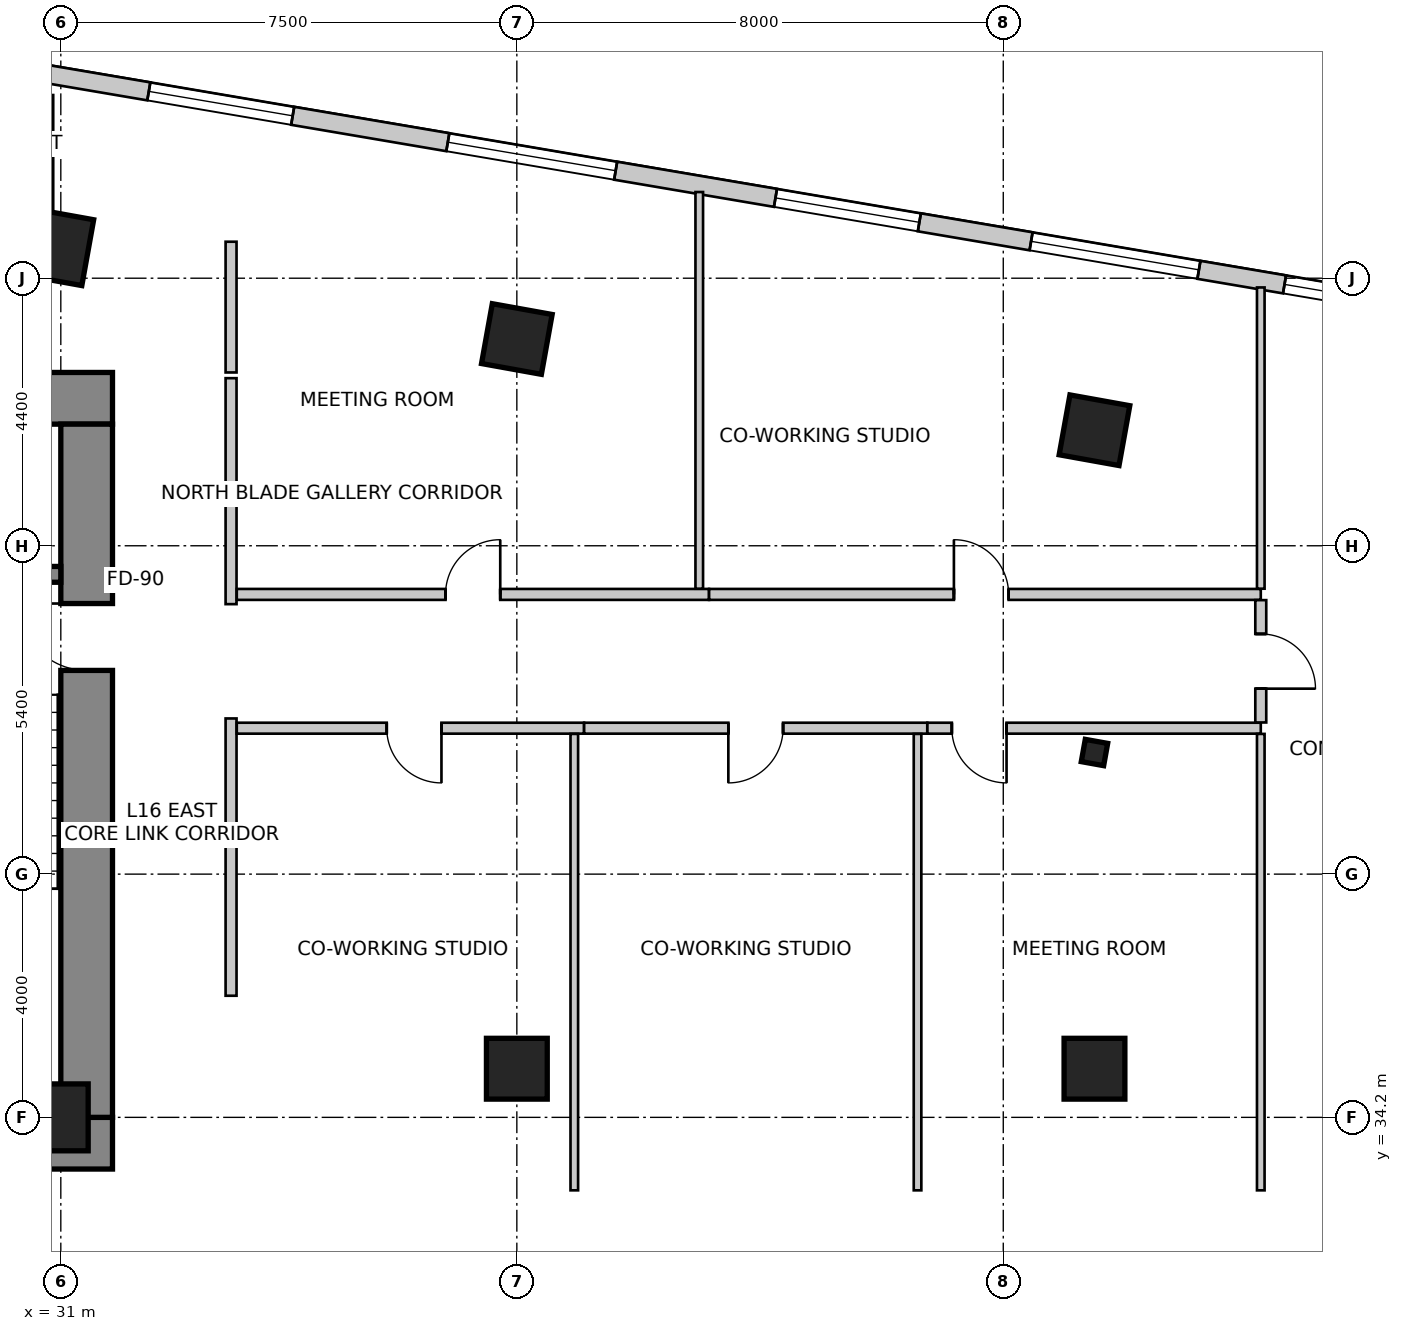
"""IFC4 building model, lengths in metres.
Left out: names, types, materials, properties, quantities, classifications, styles, units other than length and angle.
Written with IfcOpenShell. Run it as: python <this file> out.ifc"""

import sys

from ifc_helpers import new_model, si_unit, direction, frame, frame_2d, origin, origin_2d, place, context, subcontext, project, spatial, rectangle, i_section, extrude, source, transform, mapped, element, fill, save


model = new_model("IFC4")
c1 = context("Model", 3, precision=1e-05, world=origin(), true_north=direction((0.0, 1.0)))
c2 = subcontext(c1, "Body", "Model", "MODEL_VIEW")
j1 = project(units=[si_unit("LENGTHUNIT", "METRE"), si_unit("PLANEANGLEUNIT", "RADIAN")], contexts=[c1])
p1 = place(None, origin())
s1 = spatial("IfcSite", under=j1, at=p1, CompositionType="ELEMENT")
p2 = place(p1, origin())
s2 = spatial("IfcBuilding", under=s1, at=p2, CompositionType="ELEMENT")
p3 = place(p2, frame((0.0, 0.0, 67.0)))
s3 = spatial("IfcBuildingStorey", under=s2, at=p3, CompositionType="ELEMENT", Elevation=67.0)
p4 = place(p3, frame((15.75, 46.025, 0.0), z_axis=(0.0, 0.0, 1.0), x_axis=(1.0, 0.0, 0.0)))
e1 = element("IfcWall", 1, at=p4, inside=s3, PredefinedType="SHEAR", context=c2, shape_type="SweptSolid", body=[
    extrude(rectangle(XDim=16.1, YDim=0.85, at=frame_2d((8.05, 0.0))), origin(), (0.0, 0.0, 1.0), 4.0),
])
p5 = place(p3, frame((15.75, 33.775, 0.0), z_axis=(0.0, 0.0, 1.0), x_axis=(1.0, 0.0, 0.0)))
e2 = element("IfcWall", 2, at=p5, inside=s3, PredefinedType="SHEAR", context=c2, shape_type="SweptSolid", body=[
    extrude(rectangle(XDim=16.1, YDim=0.85, at=frame_2d((8.05, 0.0))), origin(), (0.0, 0.0, 1.0), 4.0),
])
m1 = source(origin(), c2, "Body", "SweptSolid", [
    extrude(rectangle(XDim=1.3, YDim=2.15, at=frame_2d((0.65, 1.075))), frame((0.0, 0.435, 0.0), z_axis=(0.0, -1.0, 0.0), x_axis=(1.0, 0.0, 0.0)), (0.0, 0.0, 1.0), 0.87),
])
p6 = place(p5, frame((10.18, 0.0, 0.0)))
e3 = element("IfcOpeningElement", 3, at=p6, cuts=e2, PredefinedType="OPENING", context=c2, shape_type="MappedRepresentation", body=[
    mapped(m1, transform((0.0, 0.0, 0.0), scale=1.0)),
])
p7 = place(p3, frame((31.425, 34.2, 0.0), z_axis=(0.0, 0.0, 1.0), x_axis=(0.0, 1.0, 0.0)))
e4 = element("IfcWall", 4, at=p7, inside=s3, PredefinedType="SHEAR", context=c2, shape_type="SweptSolid", body=[
    extrude(rectangle(XDim=11.4, YDim=0.85, at=frame_2d((5.7, 0.0))), origin(), (0.0, 0.0, 1.0), 4.0),
])
m2 = source(origin(), c2, "Body", "SweptSolid", [
    extrude(rectangle(XDim=1.1, YDim=2.15, at=frame_2d((0.55, 1.075))), frame((0.0, 0.435, 0.0), z_axis=(0.0, -1.0, 0.0), x_axis=(1.0, 0.0, 0.0)), (0.0, 0.0, 1.0), 0.87),
])
p8 = place(p7, frame((7.35, 0.0, 0.0)))
e5 = element("IfcOpeningElement", 5, at=p8, cuts=e4, PredefinedType="OPENING", context=c2, shape_type="MappedRepresentation", body=[
    mapped(m2, transform((0.0, 0.0, 0.0), scale=1.0)),
])
p9 = place(p3, frame((27.5, 43.13, 0.0), z_axis=(0.0, 0.0, 1.0), x_axis=(1.0, 0.0, 0.0)))
e6 = element("IfcWall", 6, at=p9, inside=s3, PredefinedType="SHEAR", context=c2, shape_type="SweptSolid", body=[
    extrude(rectangle(XDim=3.5, YDim=0.26, at=frame_2d((1.75, 0.0))), origin(), (0.0, 0.0, 1.0), 4.0),
])
m3 = source(origin(), c2, "Body", "SweptSolid", [
    extrude(rectangle(XDim=0.9, YDim=1.1, at=origin_2d()), origin(), (0.0, 0.0, 1.0), 4.0),
])
p10 = place(p3, frame((31.0, 48.5, 0.0), z_axis=(0.0, 0.0, 1.0), x_axis=(0.984195607969, -0.17708474032, 0.0)))
e7 = element("IfcColumn", 7, at=p10, inside=s3, PredefinedType="COLUMN", context=c2, shape_type="MappedRepresentation", body=[
    mapped(m3, transform((0.0, 0.0, 0.0), scale=1.0)),
])
m4 = source(origin(), c2, "Body", "SweptSolid", [
    extrude(rectangle(XDim=1.0, YDim=1.0, at=origin_2d()), origin(), (0.0, 0.0, 1.0), 4.0),
])
for number, where, z_axis, x_axis in (
    (8, (38.5, 47.0, 0.0), (0.0, 0.0, 1.0), (0.984, -0.177, 0.0)),
    (9, (48.0, 45.5, 0.0), (0.0, 0.0, 1.0), (0.984, -0.177, 0.0)),
):
    element("IfcColumn", number, at=place(p3, frame(where, z_axis=z_axis, x_axis=x_axis)), inside=s3, PredefinedType="COLUMN", context=c2, shape_type="MappedRepresentation", body=[
        mapped(m4, transform((0.0, 0.0, 0.0), scale=1.0)),
    ])
p11 = place(p3, frame((31.0, 34.2, 0.0), z_axis=(0.0, 0.0, 1.0), x_axis=(1.0, 0.0, 0.0)))
e10 = element("IfcColumn", 10, at=p11, inside=s3, PredefinedType="COLUMN", context=c2, shape_type="MappedRepresentation", body=[
    mapped(m3, transform((0.0, 0.0, 0.0), scale=1.0)),
])
for number, where, z_axis, x_axis in (
    (11, (38.5, 35.0, 0.0), (0.0, 0.0, 1.0), (1.0, 0.0, 0.0)),
    (12, (48.0, 35.0, 0.0), (0.0, 0.0, 1.0), (1.0, 0.0, 0.0)),
):
    element("IfcColumn", number, at=place(p3, frame(where, z_axis=z_axis, x_axis=x_axis)), inside=s3, PredefinedType="COLUMN", context=c2, shape_type="MappedRepresentation", body=[
        mapped(m4, transform((0.0, 0.0, 0.0), scale=1.0)),
    ])
m5 = source(origin(), c2, "Body", "SweptSolid", [
    extrude(i_section(OverallWidth=0.374, OverallDepth=0.372, WebThickness=0.016, FlangeThickness=0.026, FilletRadius=0.015, at=origin_2d()), origin(), (0.0, 0.0, 1.0), 4.0),
])
p12 = place(p3, frame((48.0, 40.2, 0.0), z_axis=(0.0, 0.0, 1.0), x_axis=(0.984195607969, -0.17708474032, 0.0)))
e13 = element("IfcColumn", 13, at=p12, inside=s3, PredefinedType="COLUMN", context=c2, shape_type="MappedRepresentation", body=[
    mapped(m5, transform((0.0, 0.0, 0.0), scale=1.0)),
])
p13 = place(p3, frame((53.961, 47.417, 0.0), z_axis=(0.0, 0.0, 1.0), x_axis=(-0.985865713455, 0.167537443678, 0.0)))
e14 = element("IfcWall", 14, at=p13, inside=s3, PredefinedType="SOLIDWALL", context=c2, shape_type="SweptSolid", body=[
    extrude(rectangle(XDim=32.537, YDim=0.3, at=frame_2d((16.269, 0.0))), origin(), (0.0, 0.0, 1.0), 3.75),
])
m6 = source(origin(), c2, "Body", "SweptSolid", [
    extrude(rectangle(XDim=2.4, YDim=2.2, at=frame_2d((1.2, 1.1))), frame((0.0, 0.16, 0.0), z_axis=(0.0, -1.0, 0.0), x_axis=(1.0, 0.0, 0.0)), (0.0, 0.0, 1.0), 0.32),
])
p14 = place(p13, frame((0.476, 0.0, 0.85)))
e15 = element("IfcOpeningElement", 15, at=p14, cuts=e14, PredefinedType="OPENING", context=c2, shape_type="MappedRepresentation", body=[
    mapped(m6, transform((0.0, 0.0, 0.0), scale=1.0)),
])
m7 = source(origin(), c2, "Body", "SweptSolid", [
    extrude(rectangle(XDim=2.8, YDim=2.4, at=frame_2d((1.4, 1.2))), frame((0.0, 0.16, 0.0), z_axis=(0.0, -1.0, 0.0), x_axis=(1.0, 0.0, 0.0)), (0.0, 0.0, 1.0), 0.32),
])
p15 = place(p13, frame((4.304, 0.0, 0.85)))
e16 = element("IfcOpeningElement", 16, at=p15, cuts=e14, PredefinedType="OPENING", context=c2, shape_type="MappedRepresentation", body=[
    mapped(m7, transform((0.0, 0.0, 0.0), scale=1.0)),
])
p16 = place(p13, frame((8.968, 0.0, 0.85)))
e17 = element("IfcOpeningElement", 17, at=p16, cuts=e14, PredefinedType="OPENING", context=c2, shape_type="MappedRepresentation", body=[
    mapped(m6, transform((0.0, 0.0, 0.0), scale=1.0)),
])
p17 = place(p13, frame((14.034, 0.0, 0.85)))
e18 = element("IfcOpeningElement", 18, at=p17, cuts=e14, PredefinedType="OPENING", context=c2, shape_type="MappedRepresentation", body=[
    mapped(m7, transform((0.0, 0.0, 0.0), scale=1.0)),
])
p18 = place(p13, frame((19.422, 0.0, 0.85)))
e19 = element("IfcOpeningElement", 19, at=p18, cuts=e14, PredefinedType="OPENING", context=c2, shape_type="MappedRepresentation", body=[
    mapped(m6, transform((0.0, 0.0, 0.0), scale=1.0)),
])
p19 = place(p13, frame((24.895, 0.0, 0.85)))
e20 = element("IfcOpeningElement", 20, at=p19, cuts=e14, PredefinedType="OPENING", context=c2, shape_type="MappedRepresentation", body=[
    mapped(m7, transform((0.0, 0.0, 0.0), scale=1.0)),
])
p20 = place(p13, frame((29.395, 0.0, 0.85)))
e21 = element("IfcOpeningElement", 21, at=p20, cuts=e14, PredefinedType="OPENING", context=c2, shape_type="MappedRepresentation", body=[
    mapped(m7, transform((0.0, 0.0, 0.0), scale=1.0)),
])
p21 = place(p3, frame((25.362, 48.6, 0.0), z_axis=(0.0, 0.0, 1.0), x_axis=(1.0, 0.0, 0.0)))
e22 = element("IfcWall", 22, at=p21, inside=s3, PredefinedType="PARTITIONING", context=c2, shape_type="SweptSolid", body=[
    extrude(rectangle(XDim=5.598, YDim=0.18, at=frame_2d((2.799, 0.0))), origin(), (0.0, 0.0, 1.0), 2.892),
])
m8 = source(origin(), c2, "Body", "SweptSolid", [
    extrude(rectangle(XDim=0.9, YDim=2.15, at=frame_2d((0.45, 1.075))), frame((0.0, 0.1, 0.0), z_axis=(0.0, -1.0, 0.0), x_axis=(1.0, 0.0, 0.0)), (0.0, 0.0, 1.0), 0.2),
])
p22 = place(p21, frame((2.349, 0.0, 0.0)))
e23 = element("IfcOpeningElement", 23, at=p22, cuts=e22, PredefinedType="OPENING", context=c2, shape_type="MappedRepresentation", body=[
    mapped(m8, transform((0.0, 0.0, 0.0), scale=1.0)),
])
p23 = place(p3, frame((33.8, 48.6, 0.0), z_axis=(0.0, 0.0, 1.0), x_axis=(0.0, -1.0, 0.0)))
e24 = element("IfcWall", 24, at=p23, inside=s3, PredefinedType="PARTITIONING", context=c2, shape_type="SweptSolid", body=[
    extrude(rectangle(XDim=2.15, YDim=0.18, at=frame_2d((1.075, 0.0))), origin(), (0.0, 0.0, 1.0), 2.892),
])
p24 = place(p3, frame((33.8, 40.76, 0.0), z_axis=(0.0, 0.0, 1.0), x_axis=(0.0, -1.0, 0.0)))
e25 = element("IfcWall", 25, at=p24, inside=s3, PredefinedType="PARTITIONING", context=c2, shape_type="SweptSolid", body=[
    extrude(rectangle(XDim=4.56, YDim=0.18, at=frame_2d((2.28, 0.0))), origin(), (0.0, 0.0, 1.0), 3.75),
])
p25 = place(p3, frame((33.8, 46.356, 0.0), z_axis=(0.0, 0.0, 1.0), x_axis=(0.0, -1.0, 0.0)))
e26 = element("IfcWall", 26, at=p25, inside=s3, PredefinedType="PARTITIONING", context=c2, shape_type="SweptSolid", body=[
    extrude(rectangle(XDim=3.716, YDim=0.18, at=frame_2d((1.858, 0.0))), origin(), (0.0, 0.0, 1.0), 3.279),
])
p26 = place(p3, frame((39.605, 40.6, 0.0), z_axis=(0.0, 0.0, 1.0), x_axis=(-1.0, 0.0, 0.0)))
e27 = element("IfcWall", 27, at=p26, inside=s3, PredefinedType="PARTITIONING", context=c2, shape_type="SweptSolid", body=[
    extrude(rectangle(XDim=5.711, YDim=0.18, at=frame_2d((2.855, 0.0))), origin(), (0.0, 0.0, 1.0), 3.125),
])
p27 = place(p26, frame((2.345, 0.0, 0.0)))
e28 = element("IfcOpeningElement", 28, at=p27, cuts=e27, PredefinedType="OPENING", context=c2, shape_type="MappedRepresentation", body=[
    mapped(m8, transform((0.0, 0.0, 0.0), scale=1.0)),
])
p28 = place(p3, frame((45.25, 40.6, 0.0), z_axis=(0.0, 0.0, 1.0), x_axis=(-1.0, 0.0, 0.0)))
e29 = element("IfcWall", 29, at=p28, inside=s3, PredefinedType="PARTITIONING", context=c2, shape_type="SweptSolid", body=[
    extrude(rectangle(XDim=5.643, YDim=0.18, at=frame_2d((2.822, 0.0))), origin(), (0.0, 0.0, 1.0), 3.279),
])
p29 = place(p28, frame((2.372, 0.0, 0.0)))
e30 = element("IfcOpeningElement", 30, at=p29, cuts=e29, PredefinedType="OPENING", context=c2, shape_type="MappedRepresentation", body=[
    mapped(m8, transform((0.0, 0.0, 0.0), scale=1.0)),
])
p30 = place(p3, frame((50.735, 40.6, 0.0), z_axis=(0.0, 0.0, 1.0), x_axis=(-1.0, 0.0, 0.0)))
e31 = element("IfcWall", 31, at=p30, inside=s3, PredefinedType="PARTITIONING", context=c2, shape_type="SweptSolid", body=[
    extrude(rectangle(XDim=5.483, YDim=0.18, at=frame_2d((2.742, 0.0))), origin(), (0.0, 0.0, 1.0), 3.125),
])
p31 = place(p30, frame((4.181, 0.0, 0.0)))
e32 = element("IfcOpeningElement", 32, at=p31, cuts=e31, PredefinedType="OPENING", context=c2, shape_type="MappedRepresentation", body=[
    mapped(m8, transform((0.0, 0.0, 0.0), scale=1.0)),
])
p32 = place(p3, frame((33.894, 42.8, 0.0), z_axis=(0.0, 0.0, 1.0), x_axis=(1.0, 0.0, 0.0)))
e33 = element("IfcWall", 33, at=p32, inside=s3, PredefinedType="PARTITIONING", context=c2, shape_type="SweptSolid", body=[
    extrude(rectangle(XDim=7.766, YDim=0.18, at=frame_2d((3.883, 0.0))), origin(), (0.0, 0.0, 1.0), 3.125),
])
p33 = place(p32, frame((3.433, 0.0, 0.0)))
e34 = element("IfcOpeningElement", 34, at=p33, cuts=e33, PredefinedType="OPENING", context=c2, shape_type="MappedRepresentation", body=[
    mapped(m8, transform((0.0, 0.0, 0.0), scale=1.0)),
])
p34 = place(p3, frame((41.662, 42.8, 0.0), z_axis=(0.0, 0.0, 1.0), x_axis=(1.0, 0.0, 0.0)))
e35 = element("IfcWall", 35, at=p34, inside=s3, PredefinedType="PARTITIONING", context=c2, shape_type="SweptSolid", body=[
    extrude(rectangle(XDim=9.073, YDim=0.18, at=frame_2d((4.537, 0.0))), origin(), (0.0, 0.0, 1.0), 3.125),
])
p35 = place(p34, frame((4.026, 0.0, 0.0)))
e36 = element("IfcOpeningElement", 36, at=p35, cuts=e35, PredefinedType="OPENING", context=c2, shape_type="MappedRepresentation", body=[
    mapped(m8, transform((0.0, 0.0, 0.0), scale=1.0)),
])
p36 = place(p3, frame((50.735, 42.706, 0.0), z_axis=(0.0, 0.0, 1.0), x_axis=(0.0, -1.0, 0.0)))
e37 = element("IfcWall", 37, at=p36, inside=s3, PredefinedType="PARTITIONING", context=c2, shape_type="SweptSolid", body=[
    extrude(rectangle(XDim=2.012, YDim=0.18, at=frame_2d((1.006, 0.0))), origin(), (0.0, 0.0, 1.0), 3.75),
])
p37 = place(p36, frame((0.556, 0.0, 0.0)))
e38 = element("IfcOpeningElement", 38, at=p37, cuts=e37, PredefinedType="OPENING", context=c2, shape_type="MappedRepresentation", body=[
    mapped(m8, transform((0.0, 0.0, 0.0), scale=1.0)),
])
for number, where, z_axis, x_axis in (
    (39, (39.445, 40.506, 0.0), (0.0, 0.0, 1.0), (0.0, -1.0, 0.0)),
    (40, (45.09, 40.506, 0.0), (0.0, 0.0, 1.0), (0.0, -1.0, 0.0)),
):
    element("IfcWall", number, at=place(p3, frame(where, z_axis=z_axis, x_axis=x_axis)), inside=s3, PredefinedType="PARTITIONING", context=c2, shape_type="SweptSolid", body=[
        extrude(rectangle(XDim=7.506, YDim=0.125, at=frame_2d((3.753, 0.0))), origin(), (0.0, 0.0, 1.0), 2.892),
    ])
p38 = place(p3, frame((50.735, 40.506, 0.0), z_axis=(0.0, 0.0, 1.0), x_axis=(0.0, -1.0, 0.0)))
e41 = element("IfcWall", 41, at=p38, inside=s3, PredefinedType="PARTITIONING", context=c2, shape_type="SweptSolid", body=[
    extrude(rectangle(XDim=7.506, YDim=0.125, at=frame_2d((3.753, 0.0))), origin(), (0.0, 0.0, 1.0), 3.75),
])
p39 = place(p3, frame((41.5, 49.417, 0.0), z_axis=(0.0, 0.0, 1.0), x_axis=(0.0, -1.0, 0.0)))
e42 = element("IfcWall", 42, at=p39, inside=s3, PredefinedType="PARTITIONING", context=c2, shape_type="SweptSolid", body=[
    extrude(rectangle(XDim=6.523, YDim=0.125, at=frame_2d((3.262, 0.0))), origin(), (0.0, 0.0, 1.0), 2.892),
])
p40 = place(p3, frame((50.735, 47.848, 0.0), z_axis=(0.0, 0.0, 1.0), x_axis=(0.0, -1.0, 0.0)))
e43 = element("IfcWall", 43, at=p40, inside=s3, PredefinedType="PARTITIONING", context=c2, shape_type="SweptSolid", body=[
    extrude(rectangle(XDim=4.954, YDim=0.125, at=frame_2d((2.477, 0.0))), origin(), (0.0, 0.0, 1.0), 3.75),
])
p41 = place(p3, frame((30.8, 51.013, 0.0), z_axis=(0.0, 0.0, 1.0), x_axis=(0.0, -1.0, 0.0)))
e44 = element("IfcWall", 44, at=p41, inside=s3, PredefinedType="PARTITIONING", context=c2, shape_type="SweptSolid", body=[
    extrude(rectangle(XDim=2.193, YDim=0.15, at=frame_2d((1.096, 0.0))), origin(), (0.0, 0.0, 1.0), 3.75),
])
m9 = source(origin(), c2, "Body", "SweptSolid", [
    extrude(rectangle(XDim=2.4, YDim=2.2, at=frame_2d((1.2, 1.1))), frame((0.0, -0.015, 0.0), z_axis=(0.0, -1.0, 0.0), x_axis=(1.0, 0.0, 0.0)), (0.0, 0.0, 1.0), 0.06),
])
p42 = place(p14, origin())
e45 = element("IfcWindow", 45, at=p42, inside=s3, PartitioningType="SINGLE_PANEL", PredefinedType="WINDOW", context=c2, shape_type="MappedRepresentation", body=[
    mapped(m9, transform((0.0, 0.0, 0.0), scale=1.0)),
])
fill(e15, e45)
m10 = source(origin(), c2, "Body", "SweptSolid", [
    extrude(rectangle(XDim=2.8, YDim=2.4, at=frame_2d((1.4, 1.2))), frame((0.0, -0.015, 0.0), z_axis=(0.0, -1.0, 0.0), x_axis=(1.0, 0.0, 0.0)), (0.0, 0.0, 1.0), 0.06),
])
p43 = place(p15, origin())
e46 = element("IfcWindow", 46, at=p43, inside=s3, PartitioningType="SINGLE_PANEL", PredefinedType="WINDOW", context=c2, shape_type="MappedRepresentation", body=[
    mapped(m10, transform((0.0, 0.0, 0.0), scale=1.0)),
])
fill(e16, e46)
p44 = place(p16, origin())
e47 = element("IfcWindow", 47, at=p44, inside=s3, PartitioningType="SINGLE_PANEL", PredefinedType="WINDOW", context=c2, shape_type="MappedRepresentation", body=[
    mapped(m9, transform((0.0, 0.0, 0.0), scale=1.0)),
])
fill(e17, e47)
p45 = place(p17, origin())
e48 = element("IfcWindow", 48, at=p45, inside=s3, PartitioningType="SINGLE_PANEL", PredefinedType="WINDOW", context=c2, shape_type="MappedRepresentation", body=[
    mapped(m10, transform((0.0, 0.0, 0.0), scale=1.0)),
])
fill(e18, e48)
p46 = place(p18, origin())
e49 = element("IfcWindow", 49, at=p46, inside=s3, PartitioningType="SINGLE_PANEL", PredefinedType="WINDOW", context=c2, shape_type="MappedRepresentation", body=[
    mapped(m9, transform((0.0, 0.0, 0.0), scale=1.0)),
])
fill(e19, e49)
m11 = source(origin(), c2, "Body", "SweptSolid", [
    extrude(rectangle(XDim=1.1, YDim=2.15, at=frame_2d((0.55, 1.075))), frame((0.0, 0.025, 0.0), z_axis=(0.0, -1.0, 0.0), x_axis=(1.0, 0.0, 0.0)), (0.0, 0.0, 1.0), 0.05),
])
p47 = place(p8, origin())
e50 = element("IfcDoor", 50, at=p47, inside=s3, OperationType="SINGLE_SWING_RIGHT", PredefinedType="DOOR", context=c2, shape_type="MappedRepresentation", body=[
    mapped(m11, transform((0.0, 0.0, 0.0), scale=1.0)),
])
fill(e5, e50)
m12 = source(origin(), c2, "Body", "SweptSolid", [
    extrude(rectangle(XDim=0.9, YDim=2.15, at=frame_2d((0.45, 1.075))), frame((0.0, 0.025, 0.0), z_axis=(0.0, -1.0, 0.0), x_axis=(1.0, 0.0, 0.0)), (0.0, 0.0, 1.0), 0.05),
])
p48 = place(p27, origin())
e51 = element("IfcDoor", 51, at=p48, inside=s3, OperationType="SINGLE_SWING_LEFT", PredefinedType="DOOR", context=c2, shape_type="MappedRepresentation", body=[
    mapped(m12, transform((0.0, 0.0, 0.0), scale=1.0)),
])
fill(e28, e51)
p49 = place(p29, origin())
e52 = element("IfcDoor", 52, at=p49, inside=s3, OperationType="SINGLE_SWING_RIGHT", PredefinedType="DOOR", context=c2, shape_type="MappedRepresentation", body=[
    mapped(m12, transform((0.0, 0.0, 0.0), scale=1.0)),
])
fill(e30, e52)
p50 = place(p31, origin())
e53 = element("IfcDoor", 53, at=p50, inside=s3, OperationType="SINGLE_SWING_LEFT", PredefinedType="DOOR", context=c2, shape_type="MappedRepresentation", body=[
    mapped(m12, transform((0.0, 0.0, 0.0), scale=1.0)),
])
fill(e32, e53)
p51 = place(p33, origin())
e54 = element("IfcDoor", 54, at=p51, inside=s3, OperationType="SINGLE_SWING_RIGHT", PredefinedType="DOOR", context=c2, shape_type="MappedRepresentation", body=[
    mapped(m12, transform((0.0, 0.0, 0.0), scale=1.0)),
])
fill(e34, e54)
p52 = place(p35, origin())
e55 = element("IfcDoor", 55, at=p52, inside=s3, OperationType="SINGLE_SWING_LEFT", PredefinedType="DOOR", context=c2, shape_type="MappedRepresentation", body=[
    mapped(m12, transform((0.0, 0.0, 0.0), scale=1.0)),
])
fill(e36, e55)
p53 = place(p37, origin())
e56 = element("IfcDoor", 56, at=p53, inside=s3, OperationType="SINGLE_SWING_RIGHT", PredefinedType="DOOR", context=c2, shape_type="MappedRepresentation", body=[
    mapped(m12, transform((0.0, 0.0, 0.0), scale=1.0)),
])
fill(e38, e56)
save(model, sys.argv[1])
